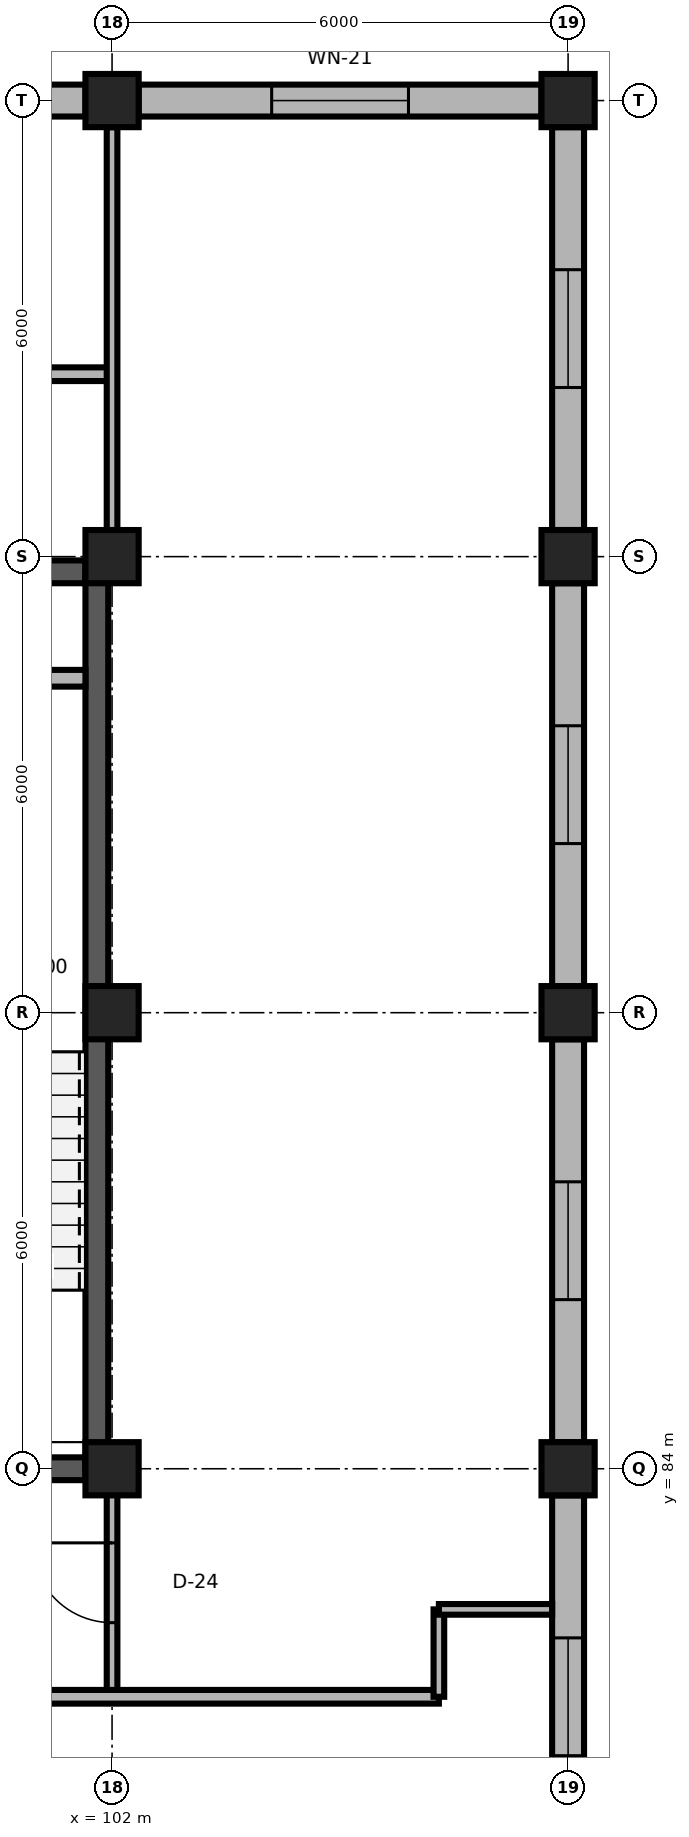
"""IFC4 building model, lengths in metres.
Left out: names, types, materials, properties, quantities, classifications, styles, units other than length and angle.
Written with IfcOpenShell. Run it as: python <this file> out.ifc"""

import sys

from ifc_helpers import new_model, si_unit, direction, frame, frame_2d, origin, origin_2d, place, context, subcontext, project, spatial, rectangle, extrude, element, fill, save


model = new_model("IFC4")
c1 = context("Model", 3, precision=1e-05, world=origin(), true_north=direction((0.0, 1.0)))
c2 = subcontext(c1, "Body", "Model", "MODEL_VIEW")
j1 = project(units=[si_unit("LENGTHUNIT", "METRE"), si_unit("PLANEANGLEUNIT", "RADIAN")], contexts=[c1])
p1 = place(None, origin())
s1 = spatial("IfcSite", under=j1, at=p1, CompositionType="ELEMENT")
p2 = place(p1, origin())
s2 = spatial("IfcBuilding", under=s1, at=p2, CompositionType="ELEMENT")
p3 = place(p2, frame((0.0, 0.0, 56.1)))
s3 = spatial("IfcBuildingStorey", under=s2, at=p3, CompositionType="ELEMENT", Elevation=56.1)
for number, where, z_axis, x_axis in (
    (1, (102.0, 84.0, 0.0), (0.0, 0.0, 1.0), (1.0, 0.0, 0.0)),
    (2, (108.0, 84.0, 0.0), (0.0, 0.0, 1.0), (1.0, 0.0, 0.0)),
    (3, (102.0, 90.0, 0.0), (0.0, 0.0, 1.0), (1.0, 0.0, 0.0)),
    (4, (108.0, 90.0, 0.0), (0.0, 0.0, 1.0), (1.0, 0.0, 0.0)),
    (5, (102.0, 96.0, 0.0), (0.0, 0.0, 1.0), (1.0, 0.0, 0.0)),
    (6, (108.0, 96.0, 0.0), (0.0, 0.0, 1.0), (1.0, 0.0, 0.0)),
    (7, (102.0, 102.0, 0.0), (0.0, 0.0, 1.0), (1.0, 0.0, 0.0)),
    (8, (108.0, 102.0, 0.0), (0.0, 0.0, 1.0), (1.0, 0.0, 0.0)),
):
    element("IfcColumn", number, at=place(p3, frame(where, z_axis=z_axis, x_axis=x_axis)), inside=s3, PredefinedType="COLUMN", context=c2, shape_type="SweptSolid", body=[
        extrude(rectangle(XDim=0.7, YDim=0.7, at=origin_2d()), origin(), (0.0, 0.0, 1.0), 3.9),
    ])
p4 = place(p3, frame((96.35, 102.0, 0.0), z_axis=(0.0, 0.0, 1.0), x_axis=(1.0, 0.0, 0.0)))
e9 = element("IfcWall", 9, at=p4, inside=s3, PredefinedType="SOLIDWALL", context=c2, shape_type="SweptSolid", body=[
    extrude(rectangle(XDim=5.3, YDim=0.42, at=frame_2d((2.65, 0.0))), origin(), (0.0, 0.0, 1.0), 3.32),
])
p5 = place(p4, frame((1.75, 0.0, 0.85)))
e10 = element("IfcOpeningElement", 10, at=p5, cuts=e9, PredefinedType="OPENING", context=c2, shape_type="SweptSolid", body=[
    extrude(rectangle(XDim=1.8, YDim=1.95, at=frame_2d((0.9, 0.975))), frame((0.0, 0.225, 0.0), z_axis=(0.0, -1.0, 0.0), x_axis=(1.0, 0.0, 0.0)), (0.0, 0.0, 1.0), 0.45),
])
p6 = place(p3, frame((102.35, 102.0, 0.0), z_axis=(0.0, 0.0, 1.0), x_axis=(1.0, 0.0, 0.0)))
e11 = element("IfcWall", 11, at=p6, inside=s3, PredefinedType="SOLIDWALL", context=c2, shape_type="SweptSolid", body=[
    extrude(rectangle(XDim=5.3, YDim=0.42, at=frame_2d((2.65, 0.0))), origin(), (0.0, 0.0, 1.0), 3.32),
])
p7 = place(p6, frame((1.75, 0.0, 0.85)))
e12 = element("IfcOpeningElement", 12, at=p7, cuts=e11, PredefinedType="OPENING", context=c2, shape_type="SweptSolid", body=[
    extrude(rectangle(XDim=1.8, YDim=1.95, at=frame_2d((0.9, 0.975))), frame((0.0, 0.225, 0.0), z_axis=(0.0, -1.0, 0.0), x_axis=(1.0, 0.0, 0.0)), (0.0, 0.0, 1.0), 0.45),
])
p8 = place(p3, frame((108.0, 78.35, 0.0), z_axis=(0.0, 0.0, 1.0), x_axis=(0.0, 1.0, 0.0)))
e13 = element("IfcWall", 13, at=p8, inside=s3, PredefinedType="SOLIDWALL", context=c2, shape_type="SweptSolid", body=[
    extrude(rectangle(XDim=5.3, YDim=0.42, at=frame_2d((2.65, 0.0))), origin(), (0.0, 0.0, 1.0), 3.32),
])
p9 = place(p8, frame((1.875, 0.0, 0.85)))
e14 = element("IfcOpeningElement", 14, at=p9, cuts=e13, PredefinedType="OPENING", context=c2, shape_type="SweptSolid", body=[
    extrude(rectangle(XDim=1.55, YDim=1.9, at=frame_2d((0.775, 0.95))), frame((0.0, 0.225, 0.0), z_axis=(0.0, -1.0, 0.0), x_axis=(1.0, 0.0, 0.0)), (0.0, 0.0, 1.0), 0.45),
])
p10 = place(p3, frame((108.0, 84.35, 0.0), z_axis=(0.0, 0.0, 1.0), x_axis=(0.0, 1.0, 0.0)))
e15 = element("IfcWall", 15, at=p10, inside=s3, PredefinedType="SOLIDWALL", context=c2, shape_type="SweptSolid", body=[
    extrude(rectangle(XDim=5.3, YDim=0.42, at=frame_2d((2.65, 0.0))), origin(), (0.0, 0.0, 1.0), 3.32),
])
p11 = place(p10, frame((1.875, 0.0, 0.85)))
e16 = element("IfcOpeningElement", 16, at=p11, cuts=e15, PredefinedType="OPENING", context=c2, shape_type="SweptSolid", body=[
    extrude(rectangle(XDim=1.55, YDim=1.9, at=frame_2d((0.775, 0.95))), frame((0.0, 0.225, 0.0), z_axis=(0.0, -1.0, 0.0), x_axis=(1.0, 0.0, 0.0)), (0.0, 0.0, 1.0), 0.45),
])
p12 = place(p3, frame((108.0, 90.35, 0.0), z_axis=(0.0, 0.0, 1.0), x_axis=(0.0, 1.0, 0.0)))
e17 = element("IfcWall", 17, at=p12, inside=s3, PredefinedType="SOLIDWALL", context=c2, shape_type="SweptSolid", body=[
    extrude(rectangle(XDim=5.3, YDim=0.42, at=frame_2d((2.65, 0.0))), origin(), (0.0, 0.0, 1.0), 3.32),
])
p13 = place(p12, frame((1.875, 0.0, 0.85)))
e18 = element("IfcOpeningElement", 18, at=p13, cuts=e17, PredefinedType="OPENING", context=c2, shape_type="SweptSolid", body=[
    extrude(rectangle(XDim=1.55, YDim=1.9, at=frame_2d((0.775, 0.95))), frame((0.0, 0.225, 0.0), z_axis=(0.0, -1.0, 0.0), x_axis=(1.0, 0.0, 0.0)), (0.0, 0.0, 1.0), 0.45),
])
p14 = place(p3, frame((108.0, 96.35, 0.0), z_axis=(0.0, 0.0, 1.0), x_axis=(0.0, 1.0, 0.0)))
e19 = element("IfcWall", 19, at=p14, inside=s3, PredefinedType="SOLIDWALL", context=c2, shape_type="SweptSolid", body=[
    extrude(rectangle(XDim=5.3, YDim=0.42, at=frame_2d((2.65, 0.0))), origin(), (0.0, 0.0, 1.0), 3.32),
])
p15 = place(p14, frame((1.875, 0.0, 0.85)))
e20 = element("IfcOpeningElement", 20, at=p15, cuts=e19, PredefinedType="OPENING", context=c2, shape_type="SweptSolid", body=[
    extrude(rectangle(XDim=1.55, YDim=1.9, at=frame_2d((0.775, 0.95))), frame((0.0, 0.225, 0.0), z_axis=(0.0, -1.0, 0.0), x_axis=(1.0, 0.0, 0.0)), (0.0, 0.0, 1.0), 0.45),
])
p16 = place(p3, frame((96.35, 84.0, 0.0), z_axis=(0.0, 0.0, 1.0), x_axis=(1.0, 0.0, 0.0)))
e21 = element("IfcWall", 21, at=p16, inside=s3, PredefinedType="SHEAR", context=c2, shape_type="SweptSolid", body=[
    extrude(rectangle(XDim=5.3, YDim=0.3, at=frame_2d((2.65, 0.0))), origin(), (0.0, 0.0, 1.0), 3.66),
])
p17 = place(p16, frame((1.975, 0.0, 0.0)))
e22 = element("IfcOpeningElement", 22, at=p17, cuts=e21, PredefinedType="OPENING", context=c2, shape_type="SweptSolid", body=[
    extrude(rectangle(XDim=1.35, YDim=2.2, at=frame_2d((0.675, 1.1))), frame((0.0, 0.165, 0.0), z_axis=(0.0, -1.0, 0.0), x_axis=(1.0, 0.0, 0.0)), (0.0, 0.0, 1.0), 0.33),
])
p18 = place(p3, frame((96.35, 95.8, 0.0), z_axis=(0.0, 0.0, 1.0), x_axis=(1.0, 0.0, 0.0)))
e23 = element("IfcWall", 23, at=p18, inside=s3, PredefinedType="SHEAR", context=c2, shape_type="SweptSolid", body=[
    extrude(rectangle(XDim=5.3, YDim=0.3, at=frame_2d((2.65, 0.0))), origin(), (0.0, 0.0, 1.0), 3.74),
])
p19 = place(p3, frame((101.8, 84.0, 0.0), z_axis=(0.0, 0.0, 1.0), x_axis=(0.0, 1.0, 0.0)))
e24 = element("IfcWall", 24, at=p19, inside=s3, PredefinedType="SHEAR", context=c2, shape_type="SweptSolid", body=[
    extrude(rectangle(XDim=11.8, YDim=0.3, at=frame_2d((5.9, 0.0))), origin(), (0.0, 0.0, 1.0), 3.74),
])
p20 = place(p3, frame((100.55, 94.4, 0.0), z_axis=(0.0, 0.0, 1.0), x_axis=(1.0, 0.0, 0.0)))
e25 = element("IfcWall", 25, at=p20, inside=s3, PredefinedType="PARTITIONING", context=c2, shape_type="SweptSolid", body=[
    extrude(rectangle(XDim=1.1, YDim=0.22, at=frame_2d((0.55, 0.0))), origin(), (0.0, 0.0, 1.0), 3.74),
])
p21 = place(p3, frame((102.0, 81.05, 0.0), z_axis=(0.0, 0.0, 1.0), x_axis=(0.0, 1.0, 0.0)))
e26 = element("IfcWall", 26, at=p21, inside=s3, PredefinedType="PARTITIONING", context=c2, shape_type="SweptSolid", body=[
    extrude(rectangle(XDim=2.9, YDim=0.14, at=frame_2d((1.45, 0.0))), origin(), (0.0, 0.0, 1.0), 3.449),
])
p22 = place(p21, frame((0.925, 0.0, 0.0)))
e27 = element("IfcOpeningElement", 27, at=p22, cuts=e26, PredefinedType="OPENING", context=c2, shape_type="SweptSolid", body=[
    extrude(rectangle(XDim=1.05, YDim=2.25, at=frame_2d((0.525, 1.125))), frame((0.0, 0.085, 0.0), z_axis=(0.0, -1.0, 0.0), x_axis=(1.0, 0.0, 0.0)), (0.0, 0.0, 1.0), 0.17),
])
p23 = place(p3, frame((96.0, 81.0, 0.0), z_axis=(0.0, 0.0, 1.0), x_axis=(1.0, 0.0, 0.0)))
e28 = element("IfcWall", 28, at=p23, inside=s3, PredefinedType="PARTITIONING", context=c2, shape_type="SweptSolid", body=[
    extrude(rectangle(XDim=10.3, YDim=0.18, at=frame_2d((5.15, 0.0))), origin(), (0.0, 0.0, 1.0), 3.74),
])
p24 = place(p3, frame((106.3, 81.0, 0.0), z_axis=(0.0, 0.0, 1.0), x_axis=(0.0, 1.0, 0.0)))
e29 = element("IfcWall", 29, at=p24, inside=s3, PredefinedType="PARTITIONING", context=c2, shape_type="SweptSolid", body=[
    extrude(rectangle(XDim=1.15, YDim=0.14, at=frame_2d((0.575, 0.0))), origin(), (0.0, 0.0, 1.0), 3.74),
])
p25 = place(p3, frame((106.3, 82.15, 0.0), z_axis=(0.0, 0.0, 1.0), x_axis=(1.0, 0.0, 0.0)))
e30 = element("IfcWall", 30, at=p25, inside=s3, PredefinedType="PARTITIONING", context=c2, shape_type="SweptSolid", body=[
    extrude(rectangle(XDim=1.49, YDim=0.14, at=frame_2d((0.745, 0.0))), origin(), (0.0, 0.0, 1.0), 3.74),
])
p26 = place(p3, frame((96.0, 98.4, 0.0), z_axis=(0.0, 0.0, 1.0), x_axis=(1.0, 0.0, 0.0)))
e31 = element("IfcWall", 31, at=p26, inside=s3, PredefinedType="PARTITIONING", context=c2, shape_type="SweptSolid", body=[
    extrude(rectangle(XDim=6.0, YDim=0.18, at=frame_2d((3.0, 0.0))), origin(), (0.0, 0.0, 1.0), 3.74),
])
p27 = place(p3, frame((102.0, 96.35, 0.0), z_axis=(0.0, 0.0, 1.0), x_axis=(0.0, 1.0, 0.0)))
e32 = element("IfcWall", 32, at=p27, inside=s3, PredefinedType="PARTITIONING", context=c2, shape_type="SweptSolid", body=[
    extrude(rectangle(XDim=5.3, YDim=0.14, at=frame_2d((2.65, 0.0))), origin(), (0.0, 0.0, 1.0), 3.449),
])
p28 = place(p7, origin())
e33 = element("IfcWindow", 33, at=p28, inside=s3, PartitioningType="SINGLE_PANEL", PredefinedType="WINDOW", context=c2, shape_type="SweptSolid", body=[
    extrude(rectangle(XDim=1.8, YDim=1.95, at=frame_2d((0.9, 0.975))), frame((0.0, 0.03, 0.0), z_axis=(0.0, -1.0, 0.0), x_axis=(1.0, 0.0, 0.0)), (0.0, 0.0, 1.0), 0.06),
])
fill(e12, e33)
p29 = place(p9, origin())
e34 = element("IfcWindow", 34, at=p29, inside=s3, PartitioningType="SINGLE_PANEL", PredefinedType="WINDOW", context=c2, shape_type="SweptSolid", body=[
    extrude(rectangle(XDim=1.55, YDim=1.9, at=frame_2d((0.775, 0.95))), frame((0.0, 0.03, 0.0), z_axis=(0.0, -1.0, 0.0), x_axis=(1.0, 0.0, 0.0)), (0.0, 0.0, 1.0), 0.06),
])
fill(e14, e34)
p30 = place(p11, origin())
e35 = element("IfcWindow", 35, at=p30, inside=s3, PartitioningType="SINGLE_PANEL", PredefinedType="WINDOW", context=c2, shape_type="SweptSolid", body=[
    extrude(rectangle(XDim=1.55, YDim=1.9, at=frame_2d((0.775, 0.95))), frame((0.0, 0.03, 0.0), z_axis=(0.0, -1.0, 0.0), x_axis=(1.0, 0.0, 0.0)), (0.0, 0.0, 1.0), 0.06),
])
fill(e16, e35)
p31 = place(p13, origin())
e36 = element("IfcWindow", 36, at=p31, inside=s3, PartitioningType="SINGLE_PANEL", PredefinedType="WINDOW", context=c2, shape_type="SweptSolid", body=[
    extrude(rectangle(XDim=1.55, YDim=1.9, at=frame_2d((0.775, 0.95))), frame((0.0, 0.03, 0.0), z_axis=(0.0, -1.0, 0.0), x_axis=(1.0, 0.0, 0.0)), (0.0, 0.0, 1.0), 0.06),
])
fill(e18, e36)
p32 = place(p15, origin())
e37 = element("IfcWindow", 37, at=p32, inside=s3, PartitioningType="SINGLE_PANEL", PredefinedType="WINDOW", context=c2, shape_type="SweptSolid", body=[
    extrude(rectangle(XDim=1.55, YDim=1.9, at=frame_2d((0.775, 0.95))), frame((0.0, 0.03, 0.0), z_axis=(0.0, -1.0, 0.0), x_axis=(1.0, 0.0, 0.0)), (0.0, 0.0, 1.0), 0.06),
])
fill(e20, e37)
p33 = place(p22, origin())
e38 = element("IfcDoor", 38, at=p33, inside=s3, OperationType="SINGLE_SWING_RIGHT", PredefinedType="DOOR", context=c2, shape_type="SweptSolid", body=[
    extrude(rectangle(XDim=1.05, YDim=2.25, at=frame_2d((0.525, 1.125))), frame((0.0, 0.025, 0.0), z_axis=(0.0, -1.0, 0.0), x_axis=(1.0, 0.0, 0.0)), (0.0, 0.0, 1.0), 0.05),
])
fill(e27, e38)
save(model, sys.argv[1])
